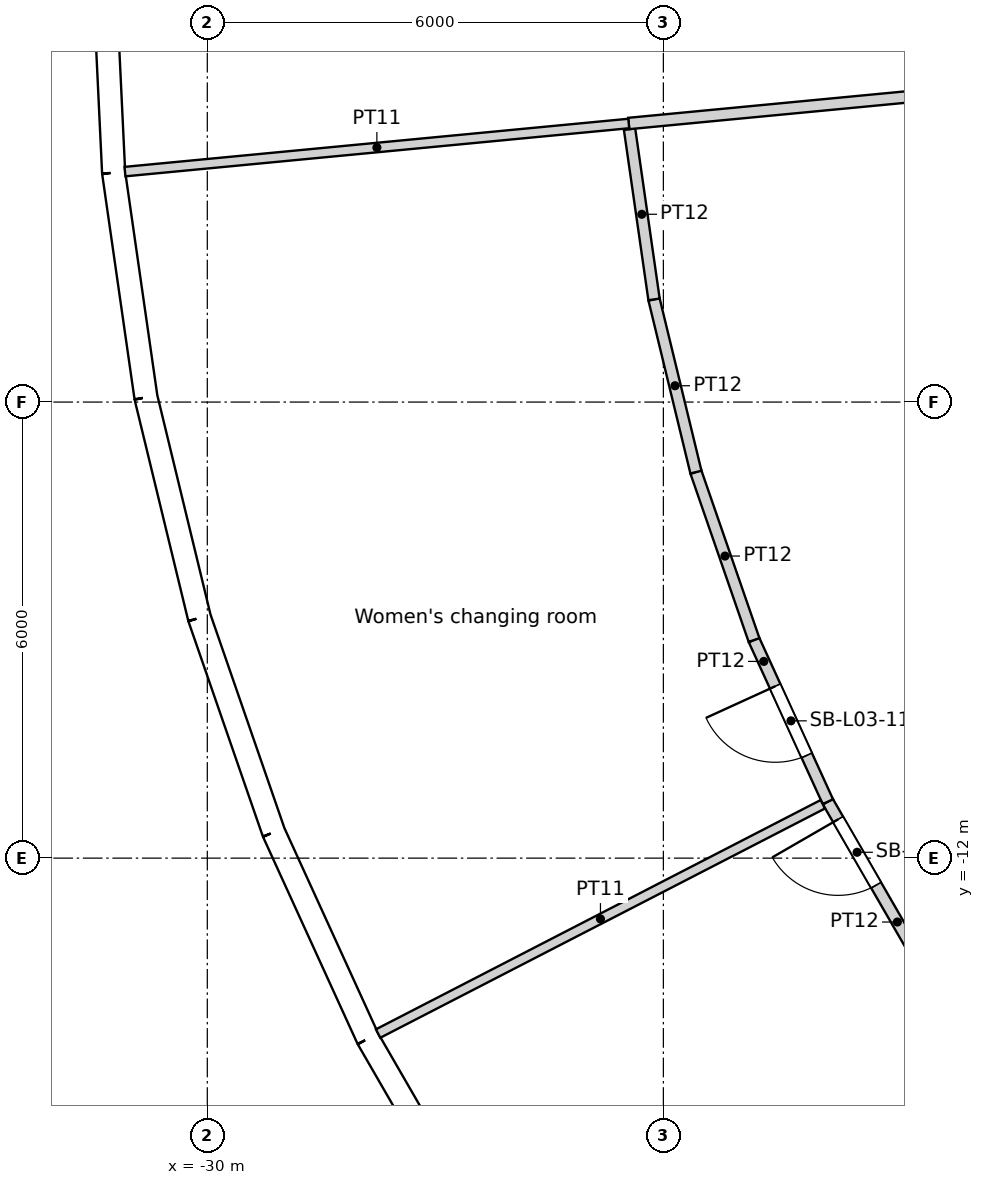
"""IFC4 building model, lengths in metres.
Left out: names, types, materials, properties, quantities, classifications, styles, units other than length and angle.
Written with IfcOpenShell. Run it as: python <this file> out.ifc"""

import sys

from ifc_helpers import new_model, si_unit, direction, frame, frame_2d, origin, origin_2d, place, context, subcontext, project, spatial, rectangle, circle, extrude, element, fill, save


model = new_model("IFC4")
c1 = context("Model", 3, precision=1e-05, world=origin(), true_north=direction((0.0, 1.0)))
c2 = subcontext(c1, "Body", "Model", "MODEL_VIEW")
j1 = project(units=[si_unit("LENGTHUNIT", "METRE"), si_unit("PLANEANGLEUNIT", "RADIAN")], contexts=[c1])
p1 = place(None, origin())
s1 = spatial("IfcSite", under=j1, at=p1, CompositionType="ELEMENT")
p2 = place(p1, origin())
s2 = spatial("IfcBuilding", under=s1, at=p2, CompositionType="ELEMENT")
p3 = place(p2, frame((0.0, 0.0, 18.6)))
s3 = spatial("IfcBuildingStorey", under=s2, at=p3, CompositionType="ELEMENT", Elevation=18.6)
for number, where, z_axis, x_axis in (
    (1, (-30.137, -2.878, 0.0), (0.0, 0.0, 1.0), (1.0, 0.0, 0.0)),
    (2, (-29.048, -8.529, 0.0), (0.0, 0.0, 1.0), (1.0, 0.0, 0.0)),
    (3, (-26.909, -13.873, 0.0), (0.0, 0.0, 1.0), (1.0, 0.0, 0.0)),
):
    element("IfcColumn", number, at=place(p3, frame(where, z_axis=z_axis, x_axis=x_axis)), inside=s3, PredefinedType="COLUMN", context=c2, shape_type="SweptSolid", body=[
        extrude(circle(Radius=0.7, at=origin_2d()), origin(), (0.0, 0.0, 1.0), 4.8),
    ])
for number, where, z_axis, x_axis in (
    (4, (-24.382, -2.85, 0.0), (0.0, 0.0, 1.0), (1.0, 0.0, 0.0)),
    (5, (-23.067, -8.396, 0.0), (0.0, 0.0, 1.0), (1.0, 0.0, 0.0)),
    (6, (-20.509, -13.489, 0.0), (0.0, 0.0, 1.0), (1.0, 0.0, 0.0)),
):
    element("IfcColumn", number, at=place(p3, frame(where, z_axis=z_axis, x_axis=x_axis)), inside=s3, PredefinedType="COLUMN", context=c2, shape_type="SweptSolid", body=[
        extrude(circle(Radius=0.75, at=origin_2d()), origin(), (0.0, 0.0, 1.0), 4.8),
    ])
p4 = place(p3, frame((-31.375, 0.0, 0.0), z_axis=(0.0, 0.0, 1.0), x_axis=(0.047588458579, -0.998867027492, 0.0)))
e7 = element("IfcWall", 7, at=p4, inside=s3, PredefinedType="SOLIDWALL", context=c2, shape_type="SweptSolid", body=[
    extrude(rectangle(XDim=2.986, YDim=0.3, at=frame_2d((1.493, 0.0))), origin(), (0.0, 0.0, 1.0), 4.35),
])
p5 = place(p4, frame((1.493, 0.0, 2.0)))
e8 = element("IfcOpeningElement", 8, at=p5, cuts=e7, PredefinedType="OPENING", context=c2, shape_type="SweptSolid", body=[
    extrude(circle(Radius=1.2, at=origin_2d()), frame((0.0, 0.16, 0.0), z_axis=(0.0, -1.0, 0.0), x_axis=(1.0, 0.0, 0.0)), (0.0, 0.0, 1.0), 0.32),
])
p6 = place(p3, frame((-31.232, -2.982, 0.0), z_axis=(0.0, 0.0, 1.0), x_axis=(0.142360001917, -0.989814947278, 0.0)))
e9 = element("IfcWall", 9, at=p6, inside=s3, PredefinedType="SOLIDWALL", context=c2, shape_type="SweptSolid", body=[
    extrude(rectangle(XDim=2.986, YDim=0.3, at=frame_2d((1.493, 0.0))), origin(), (0.0, 0.0, 1.0), 4.35),
])
p7 = place(p6, frame((1.493, 0.0, 2.0)))
e10 = element("IfcOpeningElement", 10, at=p7, cuts=e9, PredefinedType="OPENING", context=c2, shape_type="SweptSolid", body=[
    extrude(circle(Radius=1.2, at=origin_2d()), frame((0.0, 0.16, 0.0), z_axis=(0.0, -1.0, 0.0), x_axis=(1.0, 0.0, 0.0)), (0.0, 0.0, 1.0), 0.32),
])
p8 = place(p3, frame((-30.807, -5.938, 0.0), z_axis=(0.0, 0.0, 1.0), x_axis=(0.235756834479, -0.971812078026, 0.0)))
e11 = element("IfcWall", 11, at=p8, inside=s3, PredefinedType="SOLIDWALL", context=c2, shape_type="SweptSolid", body=[
    extrude(rectangle(XDim=2.986, YDim=0.3, at=frame_2d((1.493, 0.0))), origin(), (0.0, 0.0, 1.0), 4.35),
])
p9 = place(p8, frame((1.493, 0.0, 2.0)))
e12 = element("IfcOpeningElement", 12, at=p9, cuts=e11, PredefinedType="OPENING", context=c2, shape_type="SweptSolid", body=[
    extrude(circle(Radius=1.2, at=origin_2d()), frame((0.0, 0.16, 0.0), z_axis=(0.0, -1.0, 0.0), x_axis=(1.0, 0.0, 0.0)), (0.0, 0.0, 1.0), 0.32),
])
p10 = place(p3, frame((-30.104, -8.839, 0.0), z_axis=(0.0, 0.0, 1.0), x_axis=(0.327074054052, -0.944998710669, 0.0)))
e13 = element("IfcWall", 13, at=p10, inside=s3, PredefinedType="SOLIDWALL", context=c2, shape_type="SweptSolid", body=[
    extrude(rectangle(XDim=2.986, YDim=0.3, at=frame_2d((1.493, 0.0))), origin(), (0.0, 0.0, 1.0), 4.35),
])
p11 = place(p10, frame((1.493, 0.0, 2.0)))
e14 = element("IfcOpeningElement", 14, at=p11, cuts=e13, PredefinedType="OPENING", context=c2, shape_type="SweptSolid", body=[
    extrude(circle(Radius=1.2, at=origin_2d()), frame((0.0, 0.16, 0.0), z_axis=(0.0, -1.0, 0.0), x_axis=(1.0, 0.0, 0.0)), (0.0, 0.0, 1.0), 0.32),
])
p12 = place(p3, frame((-29.127, -11.661, 0.0), z_axis=(0.0, 0.0, 1.0), x_axis=(0.415373250944, -0.909651066289, 0.0)))
e15 = element("IfcWall", 15, at=p12, inside=s3, PredefinedType="SOLIDWALL", context=c2, shape_type="SweptSolid", body=[
    extrude(rectangle(XDim=2.986, YDim=0.3, at=frame_2d((1.493, 0.0))), origin(), (0.0, 0.0, 1.0), 4.35),
])
p13 = place(p12, frame((1.493, 0.0, 2.0)))
e16 = element("IfcOpeningElement", 16, at=p13, cuts=e15, PredefinedType="OPENING", context=c2, shape_type="SweptSolid", body=[
    extrude(circle(Radius=1.2, at=origin_2d()), frame((0.0, 0.16, 0.0), z_axis=(0.0, -1.0, 0.0), x_axis=(1.0, 0.0, 0.0)), (0.0, 0.0, 1.0), 0.32),
])
p14 = place(p3, frame((-27.887, -14.377, 0.0), z_axis=(0.0, 0.0, 1.0), x_axis=(0.500017373705, -0.866015372839, 0.0)))
e17 = element("IfcWall", 17, at=p14, inside=s3, PredefinedType="SOLIDWALL", context=c2, shape_type="SweptSolid", body=[
    extrude(rectangle(XDim=2.986, YDim=0.3, at=frame_2d((1.493, 0.0))), origin(), (0.0, 0.0, 1.0), 4.35),
])
p15 = place(p14, frame((1.493, 0.0, 2.0)))
e18 = element("IfcOpeningElement", 18, at=p15, cuts=e17, PredefinedType="OPENING", context=c2, shape_type="SweptSolid", body=[
    extrude(circle(Radius=1.2, at=origin_2d()), frame((0.0, 0.16, 0.0), z_axis=(0.0, -1.0, 0.0), x_axis=(1.0, 0.0, 0.0)), (0.0, 0.0, 1.0), 0.32),
])
p16 = place(p3, frame((-31.083, -2.968, 0.0), z_axis=(0.0, 0.0, 1.0), x_axis=(0.995472369192, 0.095051365982, 0.0)))
e19 = element("IfcWall", 19, at=p16, inside=s3, PredefinedType="PARTITIONING", context=c2, shape_type="SweptSolid", body=[
    extrude(rectangle(XDim=6.657, YDim=0.125, at=frame_2d((3.329, 0.0))), origin(), (0.0, 0.0, 1.0), 3.75),
])
p17 = place(p3, frame((-27.753, -14.308, 0.0), z_axis=(0.0, 0.0, 1.0), x_axis=(0.888824883914, 0.458247013886, 0.0)))
e20 = element("IfcWall", 20, at=p17, inside=s3, PredefinedType="PARTITIONING", context=c2, shape_type="SweptSolid", body=[
    extrude(rectangle(XDim=6.582, YDim=0.125, at=frame_2d((3.291, 0.0))), origin(), (0.0, 0.0, 1.0), 3.75),
])
p18 = place(p3, frame((-24.445, -2.409, 0.0), z_axis=(0.0, 0.0, 1.0), x_axis=(0.142297308559, -0.989823962115, 0.0)))
e21 = element("IfcWall", 21, at=p18, inside=s3, PredefinedType="PARTITIONING", context=c2, shape_type="SweptSolid", body=[
    extrude(rectangle(XDim=2.263, YDim=0.15, at=frame_2d((1.131, 0.0))), origin(), (0.0, 0.0, 1.0), 3.75),
])
p19 = place(p3, frame((-24.456, -2.335, 0.0), z_axis=(0.0, 0.0, 1.0), x_axis=(0.995470529319, 0.095070632993, 0.0)))
e22 = element("IfcWall", 22, at=p19, inside=s3, PredefinedType="PARTITIONING", context=c2, shape_type="SweptSolid", body=[
    extrude(rectangle(XDim=8.017, YDim=0.15, at=frame_2d((4.009, 0.0))), origin(), (0.0, 0.0, 1.0), 3.75),
])
p20 = place(p3, frame((-24.123, -4.649, 0.0), z_axis=(0.0, 0.0, 1.0), x_axis=(0.235821214509, -0.971796457489, 0.0)))
e23 = element("IfcWall", 23, at=p20, inside=s3, PredefinedType="PARTITIONING", context=c2, shape_type="SweptSolid", body=[
    extrude(rectangle(XDim=2.338, YDim=0.15, at=frame_2d((1.169, 0.0))), origin(), (0.0, 0.0, 1.0), 3.75),
])
p21 = place(p3, frame((-23.572, -6.921, 0.0), z_axis=(0.0, 0.0, 1.0), x_axis=(0.327046007052, -0.945008417566, 0.0)))
e24 = element("IfcWall", 24, at=p21, inside=s3, PredefinedType="PARTITIONING", context=c2, shape_type="SweptSolid", body=[
    extrude(rectangle(XDim=2.338, YDim=0.15, at=frame_2d((1.169, 0.0))), origin(), (0.0, 0.0, 1.0), 3.75),
])
p22 = place(p3, frame((-21.836, -11.257, 0.0), z_axis=(0.0, 0.0, 1.0), x_axis=(-0.415438886862, 0.909621092149, 0.0)))
e25 = element("IfcWall", 25, at=p22, inside=s3, PredefinedType="PARTITIONING", context=c2, shape_type="SweptSolid", body=[
    extrude(rectangle(XDim=2.338, YDim=0.15, at=frame_2d((1.169, 0.0))), origin(), (0.0, 0.0, 1.0), 3.75),
])
p23 = place(p22, frame((0.669, 0.0, 0.0)))
e26 = element("IfcOpeningElement", 26, at=p23, cuts=e25, PredefinedType="OPENING", context=c2, shape_type="SweptSolid", body=[
    extrude(rectangle(XDim=1.0, YDim=2.1, at=frame_2d((0.5, 1.05))), frame((0.0, 0.075, 0.0), z_axis=(0.0, -1.0, 0.0), x_axis=(1.0, 0.0, 0.0)), (0.0, 0.0, 1.0), 0.15),
])
p24 = place(p3, frame((-20.667, -13.282, 0.0), z_axis=(0.0, 0.0, 1.0), x_axis=(-0.500002679963, 0.866023856502, 0.0)))
e27 = element("IfcWall", 27, at=p24, inside=s3, PredefinedType="PARTITIONING", context=c2, shape_type="SweptSolid", body=[
    extrude(rectangle(XDim=2.338, YDim=0.15, at=frame_2d((1.169, 0.0))), origin(), (0.0, 0.0, 1.0), 3.75),
])
p25 = place(p24, frame((1.069, 0.0, 0.0)))
e28 = element("IfcOpeningElement", 28, at=p25, cuts=e27, PredefinedType="OPENING", context=c2, shape_type="SweptSolid", body=[
    extrude(rectangle(XDim=1.0, YDim=2.1, at=frame_2d((0.5, 1.05))), frame((0.0, 0.075, 0.0), z_axis=(0.0, -1.0, 0.0), x_axis=(1.0, 0.0, 0.0)), (0.0, 0.0, 1.0), 0.15),
])
p26 = place(p5, origin())
e29 = element("IfcWindow", 29, at=p26, inside=s3, PartitioningType="SINGLE_PANEL", PredefinedType="WINDOW", context=c2, shape_type="SweptSolid", body=[
    extrude(circle(Radius=1.2, at=origin_2d()), frame((0.0, 0.12, 0.0), z_axis=(0.0, -1.0, 0.0), x_axis=(1.0, 0.0, 0.0)), (0.0, 0.0, 1.0), 0.1),
])
fill(e8, e29)
p27 = place(p7, origin())
e30 = element("IfcWindow", 30, at=p27, inside=s3, PartitioningType="SINGLE_PANEL", PredefinedType="WINDOW", context=c2, shape_type="SweptSolid", body=[
    extrude(circle(Radius=1.2, at=origin_2d()), frame((0.0, 0.12, 0.0), z_axis=(0.0, -1.0, 0.0), x_axis=(1.0, 0.0, 0.0)), (0.0, 0.0, 1.0), 0.1),
])
fill(e10, e30)
p28 = place(p9, origin())
e31 = element("IfcWindow", 31, at=p28, inside=s3, PartitioningType="SINGLE_PANEL", PredefinedType="WINDOW", context=c2, shape_type="SweptSolid", body=[
    extrude(circle(Radius=1.2, at=origin_2d()), frame((0.0, 0.12, 0.0), z_axis=(0.0, -1.0, 0.0), x_axis=(1.0, 0.0, 0.0)), (0.0, 0.0, 1.0), 0.1),
])
fill(e12, e31)
p29 = place(p11, origin())
e32 = element("IfcWindow", 32, at=p29, inside=s3, PartitioningType="SINGLE_PANEL", PredefinedType="WINDOW", context=c2, shape_type="SweptSolid", body=[
    extrude(circle(Radius=1.2, at=origin_2d()), frame((0.0, 0.12, 0.0), z_axis=(0.0, -1.0, 0.0), x_axis=(1.0, 0.0, 0.0)), (0.0, 0.0, 1.0), 0.1),
])
fill(e14, e32)
p30 = place(p13, origin())
e33 = element("IfcWindow", 33, at=p30, inside=s3, PartitioningType="SINGLE_PANEL", PredefinedType="WINDOW", context=c2, shape_type="SweptSolid", body=[
    extrude(circle(Radius=1.2, at=origin_2d()), frame((0.0, 0.12, 0.0), z_axis=(0.0, -1.0, 0.0), x_axis=(1.0, 0.0, 0.0)), (0.0, 0.0, 1.0), 0.1),
])
fill(e16, e33)
p31 = place(p15, origin())
e34 = element("IfcWindow", 34, at=p31, inside=s3, PartitioningType="SINGLE_PANEL", PredefinedType="WINDOW", context=c2, shape_type="SweptSolid", body=[
    extrude(circle(Radius=1.2, at=origin_2d()), frame((0.0, 0.12, 0.0), z_axis=(0.0, -1.0, 0.0), x_axis=(1.0, 0.0, 0.0)), (0.0, 0.0, 1.0), 0.1),
])
fill(e18, e34)
p32 = place(p23, origin())
e35 = element("IfcDoor", 35, at=p32, inside=s3, OperationType="SINGLE_SWING_RIGHT", PredefinedType="DOOR", context=c2, shape_type="SweptSolid", body=[
    extrude(rectangle(XDim=1.0, YDim=2.1, at=frame_2d((0.5, 1.05))), frame((0.0, 0.025, 0.0), z_axis=(0.0, -1.0, 0.0), x_axis=(1.0, 0.0, 0.0)), (0.0, 0.0, 1.0), 0.05),
])
fill(e26, e35)
p33 = place(p25, origin())
e36 = element("IfcDoor", 36, at=p33, inside=s3, OperationType="SINGLE_SWING_RIGHT", PredefinedType="DOOR", context=c2, shape_type="SweptSolid", body=[
    extrude(rectangle(XDim=1.0, YDim=2.1, at=frame_2d((0.5, 1.05))), frame((0.0, 0.025, 0.0), z_axis=(0.0, -1.0, 0.0), x_axis=(1.0, 0.0, 0.0)), (0.0, 0.0, 1.0), 0.05),
])
fill(e28, e36)
save(model, sys.argv[1])
